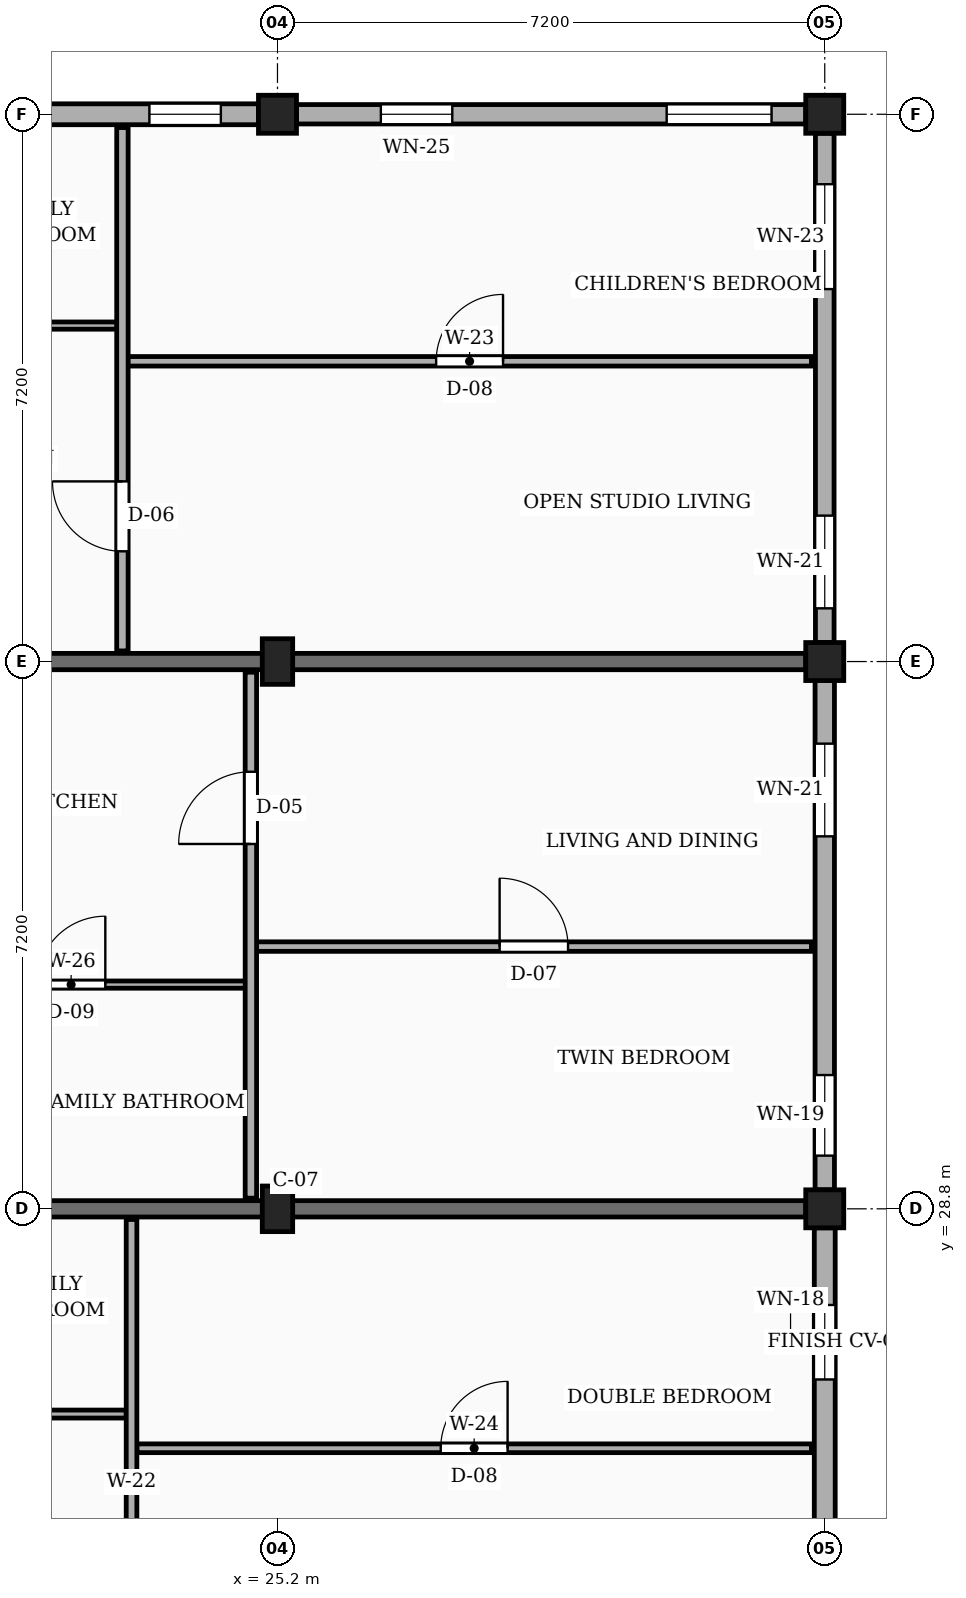
"""IFC4 building model, lengths in metres.
Left out: names, types, materials, properties, quantities, classifications, styles, units other than length and angle.
Written with IfcOpenShell. Run it as: python <this file> out.ifc"""

import sys

from ifc_helpers import new_model, si_unit, direction, frame, frame_2d, origin, origin_2d, place, context, subcontext, project, spatial, rectangle, extrude, element, fill, save


model = new_model("IFC4")
c1 = context("Model", 3, precision=1e-05, world=origin(), true_north=direction((0.0, 1.0)))
c2 = subcontext(c1, "Body", "Model", "MODEL_VIEW")
j1 = project(units=[si_unit("LENGTHUNIT", "METRE"), si_unit("PLANEANGLEUNIT", "RADIAN")], contexts=[c1])
p1 = place(None, origin())
s1 = spatial("IfcSite", under=j1, at=p1, CompositionType="ELEMENT")
p2 = place(p1, origin())
s2 = spatial("IfcBuilding", under=s1, at=p2, CompositionType="ELEMENT")
p3 = place(p2, frame((0.0, 0.0, 29.7)))
s3 = spatial("IfcBuildingStorey", under=s2, at=p3, CompositionType="ELEMENT", Elevation=29.7)
for number, where, z_axis, x_axis in (
    (1, (25.2, 28.8, 0.0), (0.0, 0.0, 1.0), (1.0, 0.0, 0.0)),
    (2, (25.2, 36.0, 0.0), (0.0, 0.0, 1.0), (1.0, 0.0, 0.0)),
):
    element("IfcColumn", number, at=place(p3, frame(where, z_axis=z_axis, x_axis=x_axis)), inside=s3, PredefinedType="COLUMN", context=c2, shape_type="SweptSolid", body=[
        extrude(rectangle(XDim=0.4, YDim=0.6, at=origin_2d()), origin(), (0.0, 0.0, 1.0), 3.15),
    ])
for number, where, z_axis, x_axis in (
    (3, (25.2, 43.2, 0.0), (0.0, 0.0, 1.0), (1.0, 0.0, 0.0)),
    (4, (32.4, 28.8, 0.0), (0.0, 0.0, 1.0), (1.0, 0.0, 0.0)),
    (5, (32.4, 36.0, 0.0), (0.0, 0.0, 1.0), (1.0, 0.0, 0.0)),
    (6, (32.4, 43.2, 0.0), (0.0, 0.0, 1.0), (1.0, 0.0, 0.0)),
):
    element("IfcColumn", number, at=place(p3, frame(where, z_axis=z_axis, x_axis=x_axis)), inside=s3, PredefinedType="COLUMN", context=c2, shape_type="SweptSolid", body=[
        extrude(rectangle(XDim=0.5, YDim=0.5, at=origin_2d()), origin(), (0.0, 0.0, 1.0), 3.15),
    ])
for number, where, z_axis, x_axis in (
    (7, (20.1, 28.8, 0.0), (0.0, 0.0, 1.0), (1.0, 0.0, 0.0)),
    (8, (20.1, 36.0, 0.0), (0.0, 0.0, 1.0), (1.0, 0.0, 0.0)),
):
    element("IfcWall", number, at=place(p3, frame(where, z_axis=z_axis, x_axis=x_axis)), inside=s3, PredefinedType="SOLIDWALL", context=c2, shape_type="SweptSolid", body=[
        extrude(rectangle(XDim=12.05, YDim=0.215, at=frame_2d((6.025, 0.0))), origin(), (0.0, 0.0, 1.0), 2.17),
    ])
p4 = place(p3, frame((32.4, 24.62, 0.0), z_axis=(0.0, 0.0, 1.0), x_axis=(0.0, 1.0, 0.0)))
e9 = element("IfcWall", 9, at=p4, inside=s3, PredefinedType="SOLIDWALL", context=c2, shape_type="SweptSolid", body=[
    extrude(rectangle(XDim=3.93, YDim=0.275, at=frame_2d((1.965, 0.0))), origin(), (0.0, 0.0, 1.0), 2.44),
])
p5 = place(p4, frame((1.935, 0.0, 0.78)))
e10 = element("IfcOpeningElement", 10, at=p5, cuts=e9, PredefinedType="OPENING", context=c2, shape_type="SweptSolid", body=[
    extrude(rectangle(XDim=0.98, YDim=1.36, at=frame_2d((0.49, 0.68))), frame((0.0, 0.147, 0.0), z_axis=(0.0, -1.0, 0.0), x_axis=(1.0, 0.0, 0.0)), (0.0, 0.0, 1.0), 0.295),
])
p6 = place(p3, frame((32.4, 29.05, 0.0), z_axis=(0.0, 0.0, 1.0), x_axis=(0.0, 1.0, 0.0)))
e11 = element("IfcWall", 11, at=p6, inside=s3, PredefinedType="SOLIDWALL", context=c2, shape_type="SweptSolid", body=[
    extrude(rectangle(XDim=6.7, YDim=0.255, at=frame_2d((3.35, 0.0))), origin(), (0.0, 0.0, 1.0), 2.44),
])
p7 = place(p6, frame((0.45, 0.0, 0.78)))
e12 = element("IfcOpeningElement", 12, at=p7, cuts=e11, PredefinedType="OPENING", context=c2, shape_type="SweptSolid", body=[
    extrude(rectangle(XDim=1.06, YDim=1.36, at=frame_2d((0.53, 0.68))), frame((0.0, 0.137, 0.0), z_axis=(0.0, -1.0, 0.0), x_axis=(1.0, 0.0, 0.0)), (0.0, 0.0, 1.0), 0.275),
])
p8 = place(p6, frame((4.65, 0.0, 0.78)))
e13 = element("IfcOpeningElement", 13, at=p8, cuts=e11, PredefinedType="OPENING", context=c2, shape_type="SweptSolid", body=[
    extrude(rectangle(XDim=1.22, YDim=1.36, at=frame_2d((0.61, 0.68))), frame((0.0, 0.137, 0.0), z_axis=(0.0, -1.0, 0.0), x_axis=(1.0, 0.0, 0.0)), (0.0, 0.0, 1.0), 0.275),
])
p9 = place(p3, frame((32.4, 36.25, 0.0), z_axis=(0.0, 0.0, 1.0), x_axis=(0.0, 1.0, 0.0)))
e14 = element("IfcWall", 14, at=p9, inside=s3, PredefinedType="SOLIDWALL", context=c2, shape_type="SweptSolid", body=[
    extrude(rectangle(XDim=6.7, YDim=0.245, at=frame_2d((3.35, 0.0))), origin(), (0.0, 0.0, 1.0), 2.44),
])
p10 = place(p9, frame((0.45, 0.0, 0.78)))
e15 = element("IfcOpeningElement", 15, at=p10, cuts=e14, PredefinedType="OPENING", context=c2, shape_type="SweptSolid", body=[
    extrude(rectangle(XDim=1.22, YDim=1.36, at=frame_2d((0.61, 0.68))), frame((0.0, 0.133, 0.0), z_axis=(0.0, -1.0, 0.0), x_axis=(1.0, 0.0, 0.0)), (0.0, 0.0, 1.0), 0.265),
])
p11 = place(p9, frame((4.65, 0.0, 0.78)))
e16 = element("IfcOpeningElement", 16, at=p11, cuts=e14, PredefinedType="OPENING", context=c2, shape_type="SweptSolid", body=[
    extrude(rectangle(XDim=1.38, YDim=1.36, at=frame_2d((0.69, 0.68))), frame((0.0, 0.133, 0.0), z_axis=(0.0, -1.0, 0.0), x_axis=(1.0, 0.0, 0.0)), (0.0, 0.0, 1.0), 0.265),
])
p12 = place(p3, frame((32.15, 43.2, 0.0), z_axis=(0.0, 0.0, 1.0), x_axis=(-1.0, 0.0, 0.0)))
e17 = element("IfcWall", 17, at=p12, inside=s3, PredefinedType="SOLIDWALL", context=c2, shape_type="SweptSolid", body=[
    extrude(rectangle(XDim=6.7, YDim=0.255, at=frame_2d((3.35, 0.0))), origin(), (0.0, 0.0, 1.0), 2.44),
])
p13 = place(p12, frame((0.45, 0.0, 0.78)))
e18 = element("IfcOpeningElement", 18, at=p13, cuts=e17, PredefinedType="OPENING", context=c2, shape_type="SweptSolid", body=[
    extrude(rectangle(XDim=1.38, YDim=1.36, at=frame_2d((0.69, 0.68))), frame((0.0, 0.137, 0.0), z_axis=(0.0, -1.0, 0.0), x_axis=(1.0, 0.0, 0.0)), (0.0, 0.0, 1.0), 0.275),
])
p14 = place(p12, frame((4.65, 0.0, 0.78)))
e19 = element("IfcOpeningElement", 19, at=p14, cuts=e17, PredefinedType="OPENING", context=c2, shape_type="SweptSolid", body=[
    extrude(rectangle(XDim=0.94, YDim=1.44, at=frame_2d((0.47, 0.72))), frame((0.0, 0.137, 0.0), z_axis=(0.0, -1.0, 0.0), x_axis=(1.0, 0.0, 0.0)), (0.0, 0.0, 1.0), 0.275),
])
p15 = place(p3, frame((24.95, 43.2, 0.0), z_axis=(0.0, 0.0, 1.0), x_axis=(-1.0, 0.0, 0.0)))
e20 = element("IfcWall", 20, at=p15, inside=s3, PredefinedType="SOLIDWALL", context=c2, shape_type="SweptSolid", body=[
    extrude(rectangle(XDim=6.7, YDim=0.275, at=frame_2d((3.35, 0.0))), origin(), (0.0, 0.0, 1.0), 2.44),
])
p16 = place(p15, frame((0.495, 0.0, 0.78)))
e21 = element("IfcOpeningElement", 21, at=p16, cuts=e20, PredefinedType="OPENING", context=c2, shape_type="SweptSolid", body=[
    extrude(rectangle(XDim=0.94, YDim=1.44, at=frame_2d((0.47, 0.72))), frame((0.0, 0.147, 0.0), z_axis=(0.0, -1.0, 0.0), x_axis=(1.0, 0.0, 0.0)), (0.0, 0.0, 1.0), 0.295),
])
p17 = place(p15, frame((2.745, 0.0, 0.78)))
e22 = element("IfcOpeningElement", 22, at=p17, cuts=e20, PredefinedType="OPENING", context=c2, shape_type="SweptSolid", body=[
    extrude(rectangle(XDim=1.15, YDim=1.44, at=frame_2d((0.575, 0.72))), frame((0.0, 0.147, 0.0), z_axis=(0.0, -1.0, 0.0), x_axis=(1.0, 0.0, 0.0)), (0.0, 0.0, 1.0), 0.295),
])
p18 = place(p15, frame((5.185, 0.0, 0.78)))
e23 = element("IfcOpeningElement", 23, at=p18, cuts=e20, PredefinedType="OPENING", context=c2, shape_type="SweptSolid", body=[
    extrude(rectangle(XDim=1.04, YDim=1.26, at=frame_2d((0.52, 0.63))), frame((0.0, 0.147, 0.0), z_axis=(0.0, -1.0, 0.0), x_axis=(1.0, 0.0, 0.0)), (0.0, 0.0, 1.0), 0.295),
])
p19 = place(p3, frame((23.35, 25.65, 0.0), z_axis=(0.0, 0.0, 1.0), x_axis=(1.0, 0.0, 0.0)))
e24 = element("IfcWall", 24, at=p19, inside=s3, PredefinedType="PARTITIONING", context=c2, shape_type="SweptSolid", body=[
    extrude(rectangle(XDim=8.875, YDim=0.115, at=frame_2d((4.438, 0.0))), origin(), (0.0, 0.0, 1.0), 2.305),
])
p20 = place(p19, frame((3.998, 0.0, 0.0)))
e25 = element("IfcOpeningElement", 25, at=p20, cuts=e24, PredefinedType="OPENING", context=c2, shape_type="SweptSolid", body=[
    extrude(rectangle(XDim=0.88, YDim=2.08, at=frame_2d((0.44, 1.04))), frame((0.0, 0.067, 0.0), z_axis=(0.0, -1.0, 0.0), x_axis=(1.0, 0.0, 0.0)), (0.0, 0.0, 1.0), 0.135),
])
p21 = place(p3, frame((20.19, 26.1, 0.0), z_axis=(0.0, 0.0, 1.0), x_axis=(1.0, 0.0, 0.0)))
e26 = element("IfcWall", 26, at=p21, inside=s3, PredefinedType="PARTITIONING", context=c2, shape_type="SweptSolid", body=[
    extrude(rectangle(XDim=3.02, YDim=0.105, at=frame_2d((1.51, 0.0))), origin(), (0.0, 0.0, 1.0), 2.305),
])
p22 = place(p21, frame((1.075, 0.0, 0.0)))
e27 = element("IfcOpeningElement", 27, at=p22, cuts=e26, PredefinedType="OPENING", context=c2, shape_type="SweptSolid", body=[
    extrude(rectangle(XDim=0.87, YDim=2.05, at=frame_2d((0.435, 1.025))), frame((0.0, 0.062, 0.0), z_axis=(0.0, -1.0, 0.0), x_axis=(1.0, 0.0, 0.0)), (0.0, 0.0, 1.0), 0.125),
])
p23 = place(p3, frame((23.28, 21.74, 0.0), z_axis=(0.0, 0.0, 1.0), x_axis=(0.0, 1.0, 0.0)))
e28 = element("IfcWall", 28, at=p23, inside=s3, PredefinedType="PARTITIONING", context=c2, shape_type="SweptSolid", body=[
    extrude(rectangle(XDim=6.92, YDim=0.14, at=frame_2d((3.46, 0.0))), origin(), (0.0, 0.0, 1.0), 2.305),
])
p24 = place(p23, frame((1.31, 0.0, 0.0)))
e29 = element("IfcOpeningElement", 29, at=p24, cuts=e28, PredefinedType="OPENING", context=c2, shape_type="SweptSolid", body=[
    extrude(rectangle(XDim=0.92, YDim=2.1, at=frame_2d((0.46, 1.05))), frame((0.0, 0.08, 0.0), z_axis=(0.0, -1.0, 0.0), x_axis=(1.0, 0.0, 0.0)), (0.0, 0.0, 1.0), 0.16),
])
p25 = place(p3, frame((24.92, 32.25, 0.0), z_axis=(0.0, 0.0, 1.0), x_axis=(1.0, 0.0, 0.0)))
e30 = element("IfcWall", 30, at=p25, inside=s3, PredefinedType="PARTITIONING", context=c2, shape_type="SweptSolid", body=[
    extrude(rectangle(XDim=7.305, YDim=0.125, at=frame_2d((3.653, 0.0))), origin(), (0.0, 0.0, 1.0), 2.305),
])
p26 = place(p25, frame((3.202, 0.0, 0.0)))
e31 = element("IfcOpeningElement", 31, at=p26, cuts=e30, PredefinedType="OPENING", context=c2, shape_type="SweptSolid", body=[
    extrude(rectangle(XDim=0.9, YDim=2.1, at=frame_2d((0.45, 1.05))), frame((0.0, 0.073, 0.0), z_axis=(0.0, -1.0, 0.0), x_axis=(1.0, 0.0, 0.0)), (0.0, 0.0, 1.0), 0.145),
])
p27 = place(p3, frame((20.19, 31.75, 0.0), z_axis=(0.0, 0.0, 1.0), x_axis=(1.0, 0.0, 0.0)))
e32 = element("IfcWall", 32, at=p27, inside=s3, PredefinedType="PARTITIONING", context=c2, shape_type="SweptSolid", body=[
    extrude(rectangle(XDim=4.59, YDim=0.095, at=frame_2d((2.295, 0.0))), origin(), (0.0, 0.0, 1.0), 2.305),
])
p28 = place(p27, frame((1.845, 0.0, 0.0)))
e33 = element("IfcOpeningElement", 33, at=p28, cuts=e32, PredefinedType="OPENING", context=c2, shape_type="SweptSolid", body=[
    extrude(rectangle(XDim=0.9, YDim=2.05, at=frame_2d((0.45, 1.025))), frame((0.0, 0.058, 0.0), z_axis=(0.0, -1.0, 0.0), x_axis=(1.0, 0.0, 0.0)), (0.0, 0.0, 1.0), 0.115),
])
p29 = place(p3, frame((24.85, 28.94, 0.0), z_axis=(0.0, 0.0, 1.0), x_axis=(0.0, 1.0, 0.0)))
e34 = element("IfcWall", 34, at=p29, inside=s3, PredefinedType="PARTITIONING", context=c2, shape_type="SweptSolid", body=[
    extrude(rectangle(XDim=6.92, YDim=0.15, at=frame_2d((3.46, 0.0))), origin(), (0.0, 0.0, 1.0), 2.305),
])
p30 = place(p29, frame((4.66, 0.0, 0.0)))
e35 = element("IfcOpeningElement", 35, at=p30, cuts=e34, PredefinedType="OPENING", context=c2, shape_type="SweptSolid", body=[
    extrude(rectangle(XDim=0.95, YDim=2.1, at=frame_2d((0.475, 1.05))), frame((0.0, 0.085, 0.0), z_axis=(0.0, -1.0, 0.0), x_axis=(1.0, 0.0, 0.0)), (0.0, 0.0, 1.0), 0.17),
])
p31 = place(p3, frame((23.23, 39.95, 0.0), z_axis=(0.0, 0.0, 1.0), x_axis=(1.0, 0.0, 0.0)))
e36 = element("IfcWall", 36, at=p31, inside=s3, PredefinedType="PARTITIONING", context=c2, shape_type="SweptSolid", body=[
    extrude(rectangle(XDim=8.995, YDim=0.125, at=frame_2d((4.498, 0.0))), origin(), (0.0, 0.0, 1.0), 2.305),
])
p32 = place(p31, frame((4.058, 0.0, 0.0)))
e37 = element("IfcOpeningElement", 37, at=p32, cuts=e36, PredefinedType="OPENING", context=c2, shape_type="SweptSolid", body=[
    extrude(rectangle(XDim=0.88, YDim=2.08, at=frame_2d((0.44, 1.04))), frame((0.0, 0.073, 0.0), z_axis=(0.0, -1.0, 0.0), x_axis=(1.0, 0.0, 0.0)), (0.0, 0.0, 1.0), 0.145),
])
p33 = place(p3, frame((20.19, 40.42, 0.0), z_axis=(0.0, 0.0, 1.0), x_axis=(1.0, 0.0, 0.0)))
e38 = element("IfcWall", 38, at=p33, inside=s3, PredefinedType="PARTITIONING", context=c2, shape_type="SweptSolid", body=[
    extrude(rectangle(XDim=2.9, YDim=0.095, at=frame_2d((1.45, 0.0))), origin(), (0.0, 0.0, 1.0), 2.305),
])
p34 = place(p33, frame((1.015, 0.0, 0.0)))
e39 = element("IfcOpeningElement", 39, at=p34, cuts=e38, PredefinedType="OPENING", context=c2, shape_type="SweptSolid", body=[
    extrude(rectangle(XDim=0.87, YDim=2.05, at=frame_2d((0.435, 1.025))), frame((0.0, 0.058, 0.0), z_axis=(0.0, -1.0, 0.0), x_axis=(1.0, 0.0, 0.0)), (0.0, 0.0, 1.0), 0.115),
])
p35 = place(p3, frame((23.16, 36.14, 0.0), z_axis=(0.0, 0.0, 1.0), x_axis=(0.0, 1.0, 0.0)))
e40 = element("IfcWall", 40, at=p35, inside=s3, PredefinedType="PARTITIONING", context=c2, shape_type="SweptSolid", body=[
    extrude(rectangle(XDim=6.885, YDim=0.15, at=frame_2d((3.442, 0.0))), origin(), (0.0, 0.0, 1.0), 2.305),
])
p36 = place(p35, frame((1.31, 0.0, 0.0)))
e41 = element("IfcOpeningElement", 41, at=p36, cuts=e40, PredefinedType="OPENING", context=c2, shape_type="SweptSolid", body=[
    extrude(rectangle(XDim=0.92, YDim=2.1, at=frame_2d((0.46, 1.05))), frame((0.0, 0.085, 0.0), z_axis=(0.0, -1.0, 0.0), x_axis=(1.0, 0.0, 0.0)), (0.0, 0.0, 1.0), 0.17),
])
p37 = place(p5, origin())
e42 = element("IfcWindow", 42, at=p37, inside=s3, PartitioningType="SINGLE_PANEL", PredefinedType="WINDOW", context=c2, shape_type="SweptSolid", body=[
    extrude(rectangle(XDim=0.98, YDim=1.36, at=frame_2d((0.49, 0.68))), frame((0.0, 0.03, 0.0), z_axis=(0.0, -1.0, 0.0), x_axis=(1.0, 0.0, 0.0)), (0.0, 0.0, 1.0), 0.06),
])
fill(e10, e42)
p38 = place(p7, origin())
e43 = element("IfcWindow", 43, at=p38, inside=s3, PartitioningType="SINGLE_PANEL", PredefinedType="WINDOW", context=c2, shape_type="SweptSolid", body=[
    extrude(rectangle(XDim=1.06, YDim=1.36, at=frame_2d((0.53, 0.68))), frame((0.0, 0.03, 0.0), z_axis=(0.0, -1.0, 0.0), x_axis=(1.0, 0.0, 0.0)), (0.0, 0.0, 1.0), 0.06),
])
fill(e12, e43)
p39 = place(p8, origin())
e44 = element("IfcWindow", 44, at=p39, inside=s3, PartitioningType="SINGLE_PANEL", PredefinedType="WINDOW", context=c2, shape_type="SweptSolid", body=[
    extrude(rectangle(XDim=1.22, YDim=1.36, at=frame_2d((0.61, 0.68))), frame((0.0, 0.03, 0.0), z_axis=(0.0, -1.0, 0.0), x_axis=(1.0, 0.0, 0.0)), (0.0, 0.0, 1.0), 0.06),
])
fill(e13, e44)
p40 = place(p10, origin())
e45 = element("IfcWindow", 45, at=p40, inside=s3, PartitioningType="SINGLE_PANEL", PredefinedType="WINDOW", context=c2, shape_type="SweptSolid", body=[
    extrude(rectangle(XDim=1.22, YDim=1.36, at=frame_2d((0.61, 0.68))), frame((0.0, 0.03, 0.0), z_axis=(0.0, -1.0, 0.0), x_axis=(1.0, 0.0, 0.0)), (0.0, 0.0, 1.0), 0.06),
])
fill(e15, e45)
p41 = place(p11, origin())
e46 = element("IfcWindow", 46, at=p41, inside=s3, PartitioningType="SINGLE_PANEL", PredefinedType="WINDOW", context=c2, shape_type="SweptSolid", body=[
    extrude(rectangle(XDim=1.38, YDim=1.36, at=frame_2d((0.69, 0.68))), frame((0.0, 0.03, 0.0), z_axis=(0.0, -1.0, 0.0), x_axis=(1.0, 0.0, 0.0)), (0.0, 0.0, 1.0), 0.06),
])
fill(e16, e46)
p42 = place(p13, origin())
e47 = element("IfcWindow", 47, at=p42, inside=s3, PartitioningType="SINGLE_PANEL", PredefinedType="WINDOW", context=c2, shape_type="SweptSolid", body=[
    extrude(rectangle(XDim=1.38, YDim=1.36, at=frame_2d((0.69, 0.68))), frame((0.0, 0.03, 0.0), z_axis=(0.0, -1.0, 0.0), x_axis=(1.0, 0.0, 0.0)), (0.0, 0.0, 1.0), 0.06),
])
fill(e18, e47)
p43 = place(p14, origin())
e48 = element("IfcWindow", 48, at=p43, inside=s3, PartitioningType="SINGLE_PANEL", PredefinedType="WINDOW", context=c2, shape_type="SweptSolid", body=[
    extrude(rectangle(XDim=0.94, YDim=1.44, at=frame_2d((0.47, 0.72))), frame((0.0, 0.03, 0.0), z_axis=(0.0, -1.0, 0.0), x_axis=(1.0, 0.0, 0.0)), (0.0, 0.0, 1.0), 0.06),
])
fill(e19, e48)
p44 = place(p16, origin())
e49 = element("IfcWindow", 49, at=p44, inside=s3, PartitioningType="SINGLE_PANEL", PredefinedType="WINDOW", context=c2, shape_type="SweptSolid", body=[
    extrude(rectangle(XDim=0.94, YDim=1.44, at=frame_2d((0.47, 0.72))), frame((0.0, 0.03, 0.0), z_axis=(0.0, -1.0, 0.0), x_axis=(1.0, 0.0, 0.0)), (0.0, 0.0, 1.0), 0.06),
])
fill(e21, e49)
p45 = place(p20, origin())
e50 = element("IfcDoor", 50, at=p45, inside=s3, OperationType="SINGLE_SWING_RIGHT", PredefinedType="DOOR", context=c2, shape_type="SweptSolid", body=[
    extrude(rectangle(XDim=0.88, YDim=2.08, at=frame_2d((0.44, 1.04))), frame((0.0, 0.025, 0.0), z_axis=(0.0, -1.0, 0.0), x_axis=(1.0, 0.0, 0.0)), (0.0, 0.0, 1.0), 0.05),
])
fill(e25, e50)
p46 = place(p26, origin())
e51 = element("IfcDoor", 51, at=p46, inside=s3, OperationType="SINGLE_SWING_LEFT", PredefinedType="DOOR", context=c2, shape_type="SweptSolid", body=[
    extrude(rectangle(XDim=0.9, YDim=2.1, at=frame_2d((0.45, 1.05))), frame((0.0, 0.025, 0.0), z_axis=(0.0, -1.0, 0.0), x_axis=(1.0, 0.0, 0.0)), (0.0, 0.0, 1.0), 0.05),
])
fill(e31, e51)
p47 = place(p28, origin())
e52 = element("IfcDoor", 52, at=p47, inside=s3, OperationType="SINGLE_SWING_RIGHT", PredefinedType="DOOR", context=c2, shape_type="SweptSolid", body=[
    extrude(rectangle(XDim=0.9, YDim=2.05, at=frame_2d((0.45, 1.025))), frame((0.0, 0.025, 0.0), z_axis=(0.0, -1.0, 0.0), x_axis=(1.0, 0.0, 0.0)), (0.0, 0.0, 1.0), 0.05),
])
fill(e33, e52)
p48 = place(p30, origin())
e53 = element("IfcDoor", 53, at=p48, inside=s3, OperationType="SINGLE_SWING_LEFT", PredefinedType="DOOR", context=c2, shape_type="SweptSolid", body=[
    extrude(rectangle(XDim=0.95, YDim=2.1, at=frame_2d((0.475, 1.05))), frame((0.0, 0.025, 0.0), z_axis=(0.0, -1.0, 0.0), x_axis=(1.0, 0.0, 0.0)), (0.0, 0.0, 1.0), 0.05),
])
fill(e35, e53)
p49 = place(p32, origin())
e54 = element("IfcDoor", 54, at=p49, inside=s3, OperationType="SINGLE_SWING_RIGHT", PredefinedType="DOOR", context=c2, shape_type="SweptSolid", body=[
    extrude(rectangle(XDim=0.88, YDim=2.08, at=frame_2d((0.44, 1.04))), frame((0.0, 0.025, 0.0), z_axis=(0.0, -1.0, 0.0), x_axis=(1.0, 0.0, 0.0)), (0.0, 0.0, 1.0), 0.05),
])
fill(e37, e54)
p50 = place(p36, origin())
e55 = element("IfcDoor", 55, at=p50, inside=s3, OperationType="SINGLE_SWING_RIGHT", PredefinedType="DOOR", context=c2, shape_type="SweptSolid", body=[
    extrude(rectangle(XDim=0.92, YDim=2.1, at=frame_2d((0.46, 1.05))), frame((0.0, 0.025, 0.0), z_axis=(0.0, -1.0, 0.0), x_axis=(1.0, 0.0, 0.0)), (0.0, 0.0, 1.0), 0.05),
])
fill(e41, e55)
save(model, sys.argv[1])
